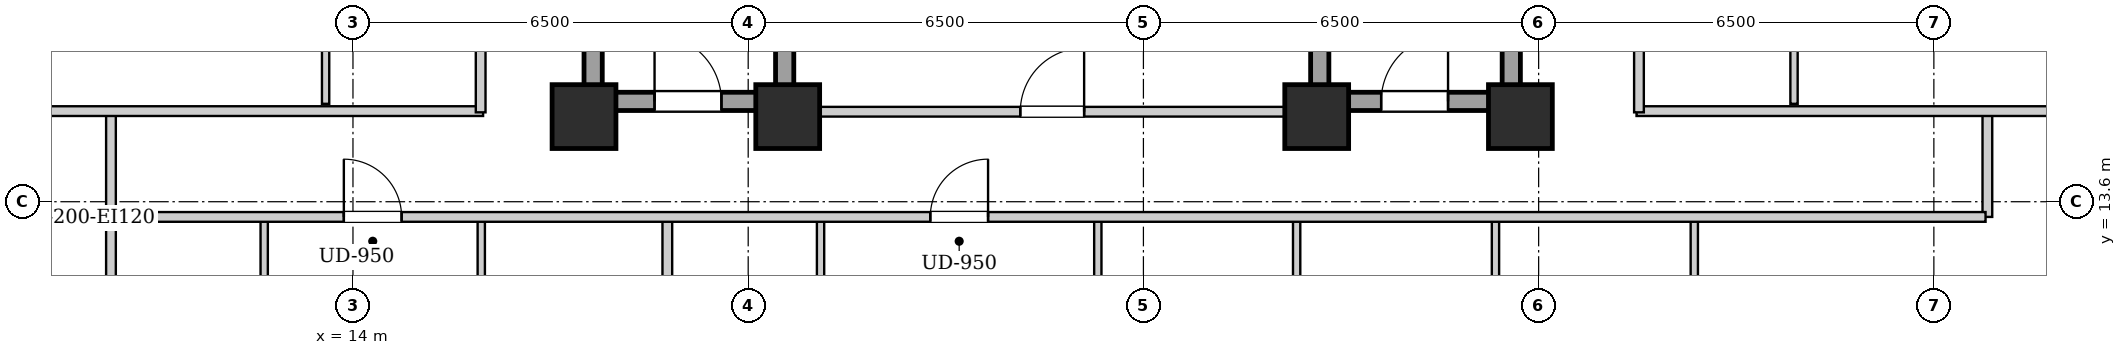
"""IFC4 building model, lengths in metres.
Left out: names, types, materials, properties, quantities, classifications, styles, units other than length and angle.
Written with IfcOpenShell. Run it as: python <this file> out.ifc"""

import sys

from ifc_helpers import new_model, si_unit, direction, frame, frame_2d, origin, origin_2d, place, context, subcontext, project, spatial, rectangle, extrude, element, fill, save


model = new_model("IFC4")
c1 = context("Model", 3, precision=1e-05, world=origin(), true_north=direction((0.0, 1.0)))
c2 = subcontext(c1, "Body", "Model", "MODEL_VIEW")
j1 = project(units=[si_unit("LENGTHUNIT", "METRE"), si_unit("PLANEANGLEUNIT", "RADIAN")], contexts=[c1])
p1 = place(None, origin())
s1 = spatial("IfcSite", under=j1, at=p1, CompositionType="ELEMENT")
p2 = place(p1, origin())
s2 = spatial("IfcBuilding", under=s1, at=p2, CompositionType="ELEMENT")
p3 = place(p2, frame((0.0, 0.0, 84.7)))
s3 = spatial("IfcBuildingStorey", under=s2, at=p3, CompositionType="ELEMENT", Elevation=84.7)
for number, where, z_axis, x_axis in (
    (1, (17.8, 15.0, 0.0), (0.0, 0.0, 1.0), (1.0, 0.0, 0.0)),
    (2, (21.15, 15.0, 0.0), (0.0, 0.0, 1.0), (1.0, 0.0, 0.0)),
    (3, (29.85, 15.0, 0.0), (0.0, 0.0, 1.0), (1.0, 0.0, 0.0)),
    (4, (33.2, 15.0, 0.0), (0.0, 0.0, 1.0), (1.0, 0.0, 0.0)),
):
    element("IfcColumn", number, at=place(p3, frame(where, z_axis=z_axis, x_axis=x_axis)), inside=s3, PredefinedType="COLUMN", context=c2, shape_type="SweptSolid", body=[
        extrude(rectangle(XDim=1.05, YDim=1.05, at=origin_2d()), origin(), (0.0, 0.0, 1.0), 3.2),
    ])
for number, where, z_axis, x_axis in (
    (5, (17.95, 15.1, 0.0), (0.0, 0.0, 1.0), (0.0, 1.0, 0.0)),
    (6, (21.1, 15.1, 0.0), (0.0, 0.0, 1.0), (0.0, 1.0, 0.0)),
):
    element("IfcWall", number, at=place(p3, frame(where, z_axis=z_axis, x_axis=x_axis)), inside=s3, PredefinedType="SHEAR", context=c2, shape_type="SweptSolid", body=[
        extrude(rectangle(XDim=9.0, YDim=0.3, at=frame_2d((4.5, 0.0))), origin(), (0.0, 0.0, 1.0), 2.94),
    ])
p4 = place(p3, frame((18.1, 15.25, 0.0), z_axis=(0.0, 0.0, 1.0), x_axis=(1.0, 0.0, 0.0)))
e7 = element("IfcWall", 7, at=p4, inside=s3, PredefinedType="SHEAR", context=c2, shape_type="SweptSolid", body=[
    extrude(rectangle(XDim=2.85, YDim=0.3, at=frame_2d((1.425, 0.0))), origin(), (0.0, 0.0, 1.0), 2.94),
])
p5 = place(p4, frame((0.86, 0.0, 0.0)))
e8 = element("IfcOpeningElement", 8, at=p5, cuts=e7, PredefinedType="OPENING", context=c2, shape_type="SweptSolid", body=[
    extrude(rectangle(XDim=1.1, YDim=2.05, at=frame_2d((0.55, 1.025))), frame((0.0, 0.16, 0.0), z_axis=(0.0, -1.0, 0.0), x_axis=(1.0, 0.0, 0.0)), (0.0, 0.0, 1.0), 0.32),
])
for number, where, z_axis, x_axis in (
    (9, (29.9, 15.1, 0.0), (0.0, 0.0, 1.0), (0.0, 1.0, 0.0)),
    (10, (33.05, 15.1, 0.0), (0.0, 0.0, 1.0), (0.0, 1.0, 0.0)),
):
    element("IfcWall", number, at=place(p3, frame(where, z_axis=z_axis, x_axis=x_axis)), inside=s3, PredefinedType="SHEAR", context=c2, shape_type="SweptSolid", body=[
        extrude(rectangle(XDim=9.0, YDim=0.3, at=frame_2d((4.5, 0.0))), origin(), (0.0, 0.0, 1.0), 2.94),
    ])
p6 = place(p3, frame((30.05, 15.25, 0.0), z_axis=(0.0, 0.0, 1.0), x_axis=(1.0, 0.0, 0.0)))
e11 = element("IfcWall", 11, at=p6, inside=s3, PredefinedType="SHEAR", context=c2, shape_type="SweptSolid", body=[
    extrude(rectangle(XDim=2.85, YDim=0.3, at=frame_2d((1.425, 0.0))), origin(), (0.0, 0.0, 1.0), 2.94),
])
p7 = place(p6, frame((0.86, 0.0, 0.0)))
e12 = element("IfcOpeningElement", 12, at=p7, cuts=e11, PredefinedType="OPENING", context=c2, shape_type="SweptSolid", body=[
    extrude(rectangle(XDim=1.1, YDim=2.05, at=frame_2d((0.55, 1.025))), frame((0.0, 0.16, 0.0), z_axis=(0.0, -1.0, 0.0), x_axis=(1.0, 0.0, 0.0)), (0.0, 0.0, 1.0), 0.32),
])
p8 = place(p3, frame((21.25, 15.08, 0.0), z_axis=(0.0, 0.0, 1.0), x_axis=(1.0, 0.0, 0.0)))
e13 = element("IfcWall", 13, at=p8, inside=s3, PredefinedType="PARTITIONING", context=c2, shape_type="SweptSolid", body=[
    extrude(rectangle(XDim=8.5, YDim=0.16, at=frame_2d((4.25, 0.0))), origin(), (0.0, 0.0, 1.0), 2.309),
])
p9 = place(p8, frame((3.725, 0.0, 0.0)))
e14 = element("IfcOpeningElement", 14, at=p9, cuts=e13, PredefinedType="OPENING", context=c2, shape_type="SweptSolid", body=[
    extrude(rectangle(XDim=1.05, YDim=2.05, at=frame_2d((0.525, 1.025))), frame((0.0, 0.09, 0.0), z_axis=(0.0, -1.0, 0.0), x_axis=(1.0, 0.0, 0.0)), (0.0, 0.0, 1.0), 0.18),
])
for number, where, z_axis, x_axis in (
    (15, (10.02, 13.35, 0.0), (0.0, 0.0, 1.0), (0.0, 1.0, 0.0)),
    (16, (40.88, 13.35, 0.0), (0.0, 0.0, 1.0), (0.0, 1.0, 0.0)),
):
    element("IfcWall", number, at=place(p3, frame(where, z_axis=z_axis, x_axis=x_axis)), inside=s3, PredefinedType="PARTITIONING", context=c2, shape_type="SweptSolid", body=[
        extrude(rectangle(XDim=1.74, YDim=0.16, at=frame_2d((0.87, 0.0))), origin(), (0.0, 0.0, 1.0), 2.94),
    ])
p10 = place(p3, frame((7.78, 15.09, 0.0), z_axis=(0.0, 0.0, 1.0), x_axis=(1.0, 0.0, 0.0)))
e17 = element("IfcWall", 17, at=p10, inside=s3, PredefinedType="PARTITIONING", context=c2, shape_type="SweptSolid", body=[
    extrude(rectangle(XDim=8.36, YDim=0.16, at=frame_2d((4.18, 0.0))), origin(), (0.0, 0.0, 1.0), 2.309),
])
p11 = place(p3, frame((35.11, 15.09, 0.0), z_axis=(0.0, 0.0, 1.0), x_axis=(1.0, 0.0, 0.0)))
e18 = element("IfcWall", 18, at=p11, inside=s3, PredefinedType="PARTITIONING", context=c2, shape_type="SweptSolid", body=[
    extrude(rectangle(XDim=8.01, YDim=0.16, at=frame_2d((4.005, 0.0))), origin(), (0.0, 0.0, 1.0), 2.309),
])
p12 = place(p3, frame((10.02, 10.4, 0.0), z_axis=(0.0, 0.0, 1.0), x_axis=(0.0, 1.0, 0.0)))
e19 = element("IfcWall", 19, at=p12, inside=s3, PredefinedType="PARTITIONING", context=c2, shape_type="SweptSolid", body=[
    extrude(rectangle(XDim=2.91, YDim=0.16, at=frame_2d((1.455, 0.0))), origin(), (0.0, 0.0, 1.0), 2.94),
])
p13 = place(p3, frame((12.54, 10.46, 0.0), z_axis=(0.0, 0.0, 1.0), x_axis=(0.0, 1.0, 0.0)))
e20 = element("IfcWall", 20, at=p13, inside=s3, PredefinedType="PARTITIONING", context=c2, shape_type="SweptSolid", body=[
    extrude(rectangle(XDim=2.85, YDim=0.12, at=frame_2d((1.425, 0.0))), origin(), (0.0, 0.0, 1.0), 2.94),
])
p14 = place(p13, frame((0.995, 0.0, 0.0)))
e21 = element("IfcOpeningElement", 21, at=p14, cuts=e20, PredefinedType="OPENING", context=c2, shape_type="SweptSolid", body=[
    extrude(rectangle(XDim=0.86, YDim=2.05, at=frame_2d((0.43, 1.025))), frame((0.0, 0.07, 0.0), z_axis=(0.0, -1.0, 0.0), x_axis=(1.0, 0.0, 0.0)), (0.0, 0.0, 1.0), 0.14),
])
p15 = place(p3, frame((16.11, 10.46, 0.0), z_axis=(0.0, 0.0, 1.0), x_axis=(0.0, 1.0, 0.0)))
e22 = element("IfcWall", 22, at=p15, inside=s3, PredefinedType="PARTITIONING", context=c2, shape_type="SweptSolid", body=[
    extrude(rectangle(XDim=2.85, YDim=0.12, at=frame_2d((1.425, 0.0))), origin(), (0.0, 0.0, 1.0), 2.94),
])
p16 = place(p15, frame((0.975, 0.0, 0.0)))
e23 = element("IfcOpeningElement", 23, at=p16, cuts=e22, PredefinedType="OPENING", context=c2, shape_type="SweptSolid", body=[
    extrude(rectangle(XDim=0.9, YDim=2.05, at=frame_2d((0.45, 1.025))), frame((0.0, 0.07, 0.0), z_axis=(0.0, -1.0, 0.0), x_axis=(1.0, 0.0, 0.0)), (0.0, 0.0, 1.0), 0.14),
])
p17 = place(p3, frame((19.17, 0.28, 0.0), z_axis=(0.0, 0.0, 1.0), x_axis=(0.0, 1.0, 0.0)))
e24 = element("IfcWall", 24, at=p17, inside=s3, PredefinedType="PARTITIONING", context=c2, shape_type="SweptSolid", body=[
    extrude(rectangle(XDim=13.03, YDim=0.16, at=frame_2d((6.515, 0.0))), origin(), (0.0, 0.0, 1.0), 2.94),
])
p18 = place(p3, frame((21.69, 10.46, 0.0), z_axis=(0.0, 0.0, 1.0), x_axis=(0.0, 1.0, 0.0)))
e25 = element("IfcWall", 25, at=p18, inside=s3, PredefinedType="PARTITIONING", context=c2, shape_type="SweptSolid", body=[
    extrude(rectangle(XDim=2.85, YDim=0.12, at=frame_2d((1.425, 0.0))), origin(), (0.0, 0.0, 1.0), 2.94),
])
p19 = place(p18, frame((0.995, 0.0, 0.0)))
e26 = element("IfcOpeningElement", 26, at=p19, cuts=e25, PredefinedType="OPENING", context=c2, shape_type="SweptSolid", body=[
    extrude(rectangle(XDim=0.86, YDim=2.05, at=frame_2d((0.43, 1.025))), frame((0.0, 0.07, 0.0), z_axis=(0.0, -1.0, 0.0), x_axis=(1.0, 0.0, 0.0)), (0.0, 0.0, 1.0), 0.14),
])
p20 = place(p3, frame((26.25, 10.46, 0.0), z_axis=(0.0, 0.0, 1.0), x_axis=(0.0, 1.0, 0.0)))
e27 = element("IfcWall", 27, at=p20, inside=s3, PredefinedType="PARTITIONING", context=c2, shape_type="SweptSolid", body=[
    extrude(rectangle(XDim=2.85, YDim=0.12, at=frame_2d((1.425, 0.0))), origin(), (0.0, 0.0, 1.0), 2.94),
])
p21 = place(p20, frame((0.975, 0.0, 0.0)))
e28 = element("IfcOpeningElement", 28, at=p21, cuts=e27, PredefinedType="OPENING", context=c2, shape_type="SweptSolid", body=[
    extrude(rectangle(XDim=0.9, YDim=2.05, at=frame_2d((0.45, 1.025))), frame((0.0, 0.07, 0.0), z_axis=(0.0, -1.0, 0.0), x_axis=(1.0, 0.0, 0.0)), (0.0, 0.0, 1.0), 0.14),
])
p22 = place(p3, frame((29.52, 10.46, 0.0), z_axis=(0.0, 0.0, 1.0), x_axis=(0.0, 1.0, 0.0)))
e29 = element("IfcWall", 29, at=p22, inside=s3, PredefinedType="PARTITIONING", context=c2, shape_type="SweptSolid", body=[
    extrude(rectangle(XDim=2.85, YDim=0.12, at=frame_2d((1.425, 0.0))), origin(), (0.0, 0.0, 1.0), 2.94),
])
p23 = place(p22, frame((0.975, 0.0, 0.0)))
e30 = element("IfcOpeningElement", 30, at=p23, cuts=e29, PredefinedType="OPENING", context=c2, shape_type="SweptSolid", body=[
    extrude(rectangle(XDim=0.9, YDim=2.05, at=frame_2d((0.45, 1.025))), frame((0.0, 0.07, 0.0), z_axis=(0.0, -1.0, 0.0), x_axis=(1.0, 0.0, 0.0)), (0.0, 0.0, 1.0), 0.14),
])
p24 = place(p3, frame((32.79, 10.46, 0.0), z_axis=(0.0, 0.0, 1.0), x_axis=(0.0, 1.0, 0.0)))
e31 = element("IfcWall", 31, at=p24, inside=s3, PredefinedType="PARTITIONING", context=c2, shape_type="SweptSolid", body=[
    extrude(rectangle(XDim=2.85, YDim=0.12, at=frame_2d((1.425, 0.0))), origin(), (0.0, 0.0, 1.0), 2.94),
])
p25 = place(p24, frame((0.975, 0.0, 0.0)))
e32 = element("IfcOpeningElement", 32, at=p25, cuts=e31, PredefinedType="OPENING", context=c2, shape_type="SweptSolid", body=[
    extrude(rectangle(XDim=0.9, YDim=2.05, at=frame_2d((0.45, 1.025))), frame((0.0, 0.07, 0.0), z_axis=(0.0, -1.0, 0.0), x_axis=(1.0, 0.0, 0.0)), (0.0, 0.0, 1.0), 0.14),
])
p26 = place(p3, frame((36.06, 10.46, 0.0), z_axis=(0.0, 0.0, 1.0), x_axis=(0.0, 1.0, 0.0)))
e33 = element("IfcWall", 33, at=p26, inside=s3, PredefinedType="PARTITIONING", context=c2, shape_type="SweptSolid", body=[
    extrude(rectangle(XDim=2.85, YDim=0.12, at=frame_2d((1.425, 0.0))), origin(), (0.0, 0.0, 1.0), 2.94),
])
p27 = place(p26, frame((0.975, 0.0, 0.0)))
e34 = element("IfcOpeningElement", 34, at=p27, cuts=e33, PredefinedType="OPENING", context=c2, shape_type="SweptSolid", body=[
    extrude(rectangle(XDim=0.9, YDim=2.05, at=frame_2d((0.45, 1.025))), frame((0.0, 0.07, 0.0), z_axis=(0.0, -1.0, 0.0), x_axis=(1.0, 0.0, 0.0)), (0.0, 0.0, 1.0), 0.14),
])
for number, where, z_axis, x_axis in (
    (35, (13.55, 15.21, 0.0), (0.0, 0.0, 1.0), (0.0, 1.0, 0.0)),
    (36, (37.7, 15.21, 0.0), (0.0, 0.0, 1.0), (0.0, 1.0, 0.0)),
):
    element("IfcWall", number, at=place(p3, frame(where, z_axis=z_axis, x_axis=x_axis)), inside=s3, PredefinedType="PARTITIONING", context=c2, shape_type="SweptSolid", body=[
        extrude(rectangle(XDim=2.3, YDim=0.12, at=frame_2d((1.15, 0.0))), origin(), (0.0, 0.0, 1.0), 2.94),
    ])
p28 = place(p3, frame((10.05, 13.35, 0.0), z_axis=(0.0, 0.0, 1.0), x_axis=(1.0, 0.0, 0.0)))
e37 = element("IfcWall", 37, at=p28, inside=s3, PredefinedType="PARTITIONING", context=c2, shape_type="SweptSolid", body=[
    extrude(rectangle(XDim=30.8, YDim=0.16, at=frame_2d((15.4, 0.0))), origin(), (0.0, 0.0, 1.0), 2.94),
])
p29 = place(p28, frame((3.8, 0.0, 0.0)))
e38 = element("IfcOpeningElement", 38, at=p29, cuts=e37, PredefinedType="OPENING", context=c2, shape_type="SweptSolid", body=[
    extrude(rectangle(XDim=0.95, YDim=2.1, at=frame_2d((0.475, 1.05))), frame((0.0, 0.09, 0.0), z_axis=(0.0, -1.0, 0.0), x_axis=(1.0, 0.0, 0.0)), (0.0, 0.0, 1.0), 0.18),
])
p30 = place(p28, frame((13.445, 0.0, 0.0)))
e39 = element("IfcOpeningElement", 39, at=p30, cuts=e37, PredefinedType="OPENING", context=c2, shape_type="SweptSolid", body=[
    extrude(rectangle(XDim=0.95, YDim=2.1, at=frame_2d((0.475, 1.05))), frame((0.0, 0.09, 0.0), z_axis=(0.0, -1.0, 0.0), x_axis=(1.0, 0.0, 0.0)), (0.0, 0.0, 1.0), 0.18),
])
p31 = place(p3, frame((16.1, 15.07, 0.0), z_axis=(0.0, 0.0, 1.0), x_axis=(0.0, 1.0, 0.0)))
e40 = element("IfcWall", 40, at=p31, inside=s3, PredefinedType="PARTITIONING", context=c2, shape_type="SweptSolid", body=[
    extrude(rectangle(XDim=13.93, YDim=0.16, at=frame_2d((6.965, 0.0))), origin(), (0.0, 0.0, 1.0), 2.94),
])
p32 = place(p31, frame((4.385, 0.0, 0.0)))
e41 = element("IfcOpeningElement", 41, at=p32, cuts=e40, PredefinedType="OPENING", context=c2, shape_type="SweptSolid", body=[
    extrude(rectangle(XDim=0.95, YDim=2.1, at=frame_2d((0.475, 1.05))), frame((0.0, 0.09, 0.0), z_axis=(0.0, -1.0, 0.0), x_axis=(1.0, 0.0, 0.0)), (0.0, 0.0, 1.0), 0.18),
])
p33 = place(p3, frame((35.15, 15.07, 0.0), z_axis=(0.0, 0.0, 1.0), x_axis=(0.0, 1.0, 0.0)))
e42 = element("IfcWall", 42, at=p33, inside=s3, PredefinedType="PARTITIONING", context=c2, shape_type="SweptSolid", body=[
    extrude(rectangle(XDim=13.93, YDim=0.16, at=frame_2d((6.965, 0.0))), origin(), (0.0, 0.0, 1.0), 2.94),
])
p34 = place(p33, frame((4.385, 0.0, 0.0)))
e43 = element("IfcOpeningElement", 43, at=p34, cuts=e42, PredefinedType="OPENING", context=c2, shape_type="SweptSolid", body=[
    extrude(rectangle(XDim=0.95, YDim=2.1, at=frame_2d((0.475, 1.05))), frame((0.0, 0.09, 0.0), z_axis=(0.0, -1.0, 0.0), x_axis=(1.0, 0.0, 0.0)), (0.0, 0.0, 1.0), 0.18),
])
p35 = place(p5, origin())
e44 = element("IfcDoor", 44, at=p35, inside=s3, OperationType="SINGLE_SWING_LEFT", PredefinedType="DOOR", context=c2, shape_type="SweptSolid", body=[
    extrude(rectangle(XDim=1.1, YDim=2.05, at=frame_2d((0.55, 1.025))), frame((0.0, 0.025, 0.0), z_axis=(0.0, -1.0, 0.0), x_axis=(1.0, 0.0, 0.0)), (0.0, 0.0, 1.0), 0.05),
])
fill(e8, e44)
p36 = place(p7, origin())
e45 = element("IfcDoor", 45, at=p36, inside=s3, OperationType="SINGLE_SWING_RIGHT", PredefinedType="DOOR", context=c2, shape_type="SweptSolid", body=[
    extrude(rectangle(XDim=1.1, YDim=2.05, at=frame_2d((0.55, 1.025))), frame((0.0, 0.025, 0.0), z_axis=(0.0, -1.0, 0.0), x_axis=(1.0, 0.0, 0.0)), (0.0, 0.0, 1.0), 0.05),
])
fill(e12, e45)
p37 = place(p9, origin())
e46 = element("IfcDoor", 46, at=p37, inside=s3, OperationType="SINGLE_SWING_RIGHT", PredefinedType="DOOR", context=c2, shape_type="SweptSolid", body=[
    extrude(rectangle(XDim=1.05, YDim=2.05, at=frame_2d((0.525, 1.025))), frame((0.0, 0.025, 0.0), z_axis=(0.0, -1.0, 0.0), x_axis=(1.0, 0.0, 0.0)), (0.0, 0.0, 1.0), 0.05),
])
fill(e14, e46)
p38 = place(p29, origin())
e47 = element("IfcDoor", 47, at=p38, inside=s3, OperationType="SINGLE_SWING_LEFT", PredefinedType="DOOR", context=c2, shape_type="SweptSolid", body=[
    extrude(rectangle(XDim=0.95, YDim=2.1, at=frame_2d((0.475, 1.05))), frame((0.0, 0.025, 0.0), z_axis=(0.0, -1.0, 0.0), x_axis=(1.0, 0.0, 0.0)), (0.0, 0.0, 1.0), 0.05),
])
fill(e38, e47)
p39 = place(p30, origin())
e48 = element("IfcDoor", 48, at=p39, inside=s3, OperationType="SINGLE_SWING_RIGHT", PredefinedType="DOOR", context=c2, shape_type="SweptSolid", body=[
    extrude(rectangle(XDim=0.95, YDim=2.1, at=frame_2d((0.475, 1.05))), frame((0.0, 0.025, 0.0), z_axis=(0.0, -1.0, 0.0), x_axis=(1.0, 0.0, 0.0)), (0.0, 0.0, 1.0), 0.05),
])
fill(e39, e48)
save(model, sys.argv[1])
